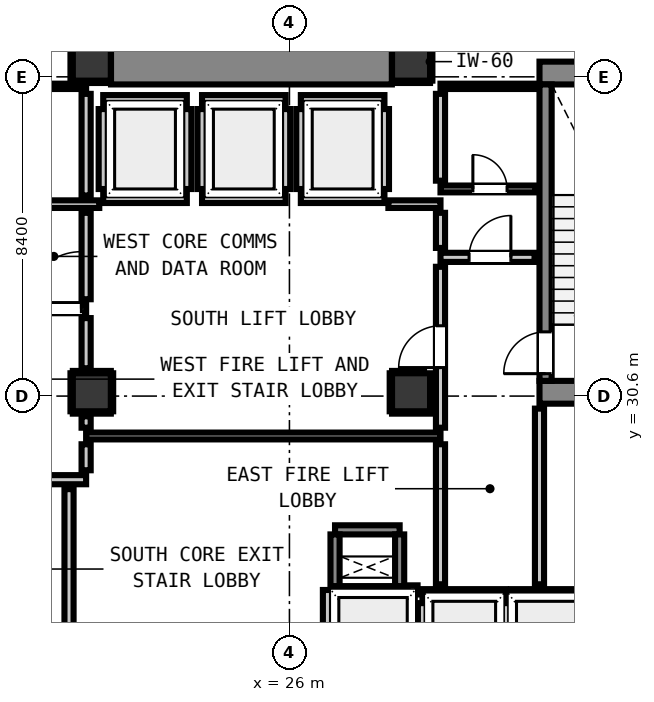
"""IFC4 building model, lengths in metres.
Left out: names, types, materials, properties, quantities, classifications, styles, units other than length and angle.
Written with IfcOpenShell. Run it as: python <this file> out.ifc"""

import sys

from ifc_helpers import new_model, si_unit, direction, frame, frame_2d, origin, origin_2d, place, context, subcontext, project, spatial, rectangle, extrude, element, fill, save


model = new_model("IFC4")
c1 = context("Model", 3, precision=1e-05, world=origin(), true_north=direction((0.0, 1.0)))
c2 = subcontext(c1, "Body", "Model", "MODEL_VIEW")
j1 = project(units=[si_unit("LENGTHUNIT", "METRE"), si_unit("PLANEANGLEUNIT", "RADIAN")], contexts=[c1])
p1 = place(None, origin())
s1 = spatial("IfcSite", under=j1, at=p1, CompositionType="ELEMENT")
p2 = place(p1, origin())
s2 = spatial("IfcBuilding", under=s1, at=p2, CompositionType="ELEMENT")
p3 = place(p2, frame((0.0, 0.0, 9.4)))
s3 = spatial("IfcBuildingStorey", under=s2, at=p3, CompositionType="ELEMENT", Elevation=9.4)
for number, where, z_axis, x_axis in (
    (1, (20.8, 39.4, 0.0), (0.0, 0.0, 1.0), (1.0, 0.0, 0.0)),
    (2, (29.2, 39.4, 0.0), (0.0, 0.0, 1.0), (1.0, 0.0, 0.0)),
):
    element("IfcColumn", number, at=place(p3, frame(where, z_axis=z_axis, x_axis=x_axis)), inside=s3, PredefinedType="COLUMN", context=c2, shape_type="SweptSolid", body=[
        extrude(rectangle(XDim=1.0, YDim=1.0, at=origin_2d()), origin(), (0.0, 0.0, 1.0), 4.2),
    ])
p4 = place(p3, frame((32.58, 39.1, 0.0), z_axis=(0.0, 0.0, 1.0), x_axis=(1.0, 0.0, 0.0)))
e3 = element("IfcWall", 3, at=p4, inside=s3, PredefinedType="SHEAR", context=c2, shape_type="SweptSolid", body=[
    extrude(rectangle(XDim=4.08, YDim=0.6, at=frame_2d((2.04, 0.0))), origin(), (0.0, 0.0, 1.0), 4.2),
])
p5 = place(p3, frame((32.58, 30.7, 0.0), z_axis=(0.0, 0.0, 1.0), x_axis=(1.0, 0.0, 0.0)))
e4 = element("IfcWall", 4, at=p5, inside=s3, PredefinedType="SHEAR", context=c2, shape_type="SweptSolid", body=[
    extrude(rectangle(XDim=3.415, YDim=0.6, at=frame_2d((1.708, 0.0))), origin(), (0.0, 0.0, 1.0), 4.2),
])
p6 = place(p3, frame((21.305, 39.4, 0.0), z_axis=(0.0, 0.0, 1.0), x_axis=(1.0, 0.0, 0.0)))
e5 = element("IfcWall", 5, at=p6, inside=s3, PredefinedType="SHEAR", context=c2, shape_type="SweptSolid", body=[
    extrude(rectangle(XDim=7.39, YDim=1.2, at=frame_2d((3.695, 0.0))), origin(), (0.0, 0.0, 1.0), 4.2),
])
p7 = place(p3, frame((32.74, 31.0, 0.0), z_axis=(0.0, 0.0, 1.0), x_axis=(0.0, 1.0, 0.0)))
e6 = element("IfcWall", 6, at=p7, inside=s3, PredefinedType="SHEAR", context=c2, shape_type="SweptSolid", body=[
    extrude(rectangle(XDim=7.8, YDim=0.32, at=frame_2d((3.9, 0.0))), origin(), (0.0, 0.0, 1.0), 4.2),
])
p8 = place(p7, frame((0.19, 0.0, 0.0)))
e7 = element("IfcOpeningElement", 7, at=p8, cuts=e6, PredefinedType="OPENING", context=c2, shape_type="SweptSolid", body=[
    extrude(rectangle(XDim=1.1, YDim=2.15, at=frame_2d((0.55, 1.075))), frame((0.0, 0.17, 0.0), z_axis=(0.0, -1.0, 0.0), x_axis=(1.0, 0.0, 0.0)), (0.0, 0.0, 1.0), 0.34),
])
for number, where, z_axis, x_axis in (
    (8, (27.2, 25.48, 0.0), (0.0, 0.0, 1.0), (1.0, 0.0, 0.0)),
    (9, (27.2, 27.08, 0.0), (0.0, 0.0, 1.0), (1.0, 0.0, 0.0)),
):
    element("IfcWall", number, at=place(p3, frame(where, z_axis=z_axis, x_axis=x_axis)), inside=s3, PredefinedType="SHEAR", context=c2, shape_type="SweptSolid", body=[
        extrude(rectangle(XDim=1.7, YDim=0.24, at=frame_2d((0.85, 0.0))), origin(), (0.0, 0.0, 1.0), 4.2),
    ])
for number, where, z_axis, x_axis in (
    (10, (27.2, 25.6, 0.0), (0.0, 0.0, 1.0), (0.0, 1.0, 0.0)),
    (11, (28.9, 25.6, 0.0), (0.0, 0.0, 1.0), (0.0, 1.0, 0.0)),
):
    element("IfcWall", number, at=place(p3, frame(where, z_axis=z_axis, x_axis=x_axis)), inside=s3, PredefinedType="SHEAR", context=c2, shape_type="SweptSolid", body=[
        extrude(rectangle(XDim=1.36, YDim=0.24, at=frame_2d((0.68, 0.0))), origin(), (0.0, 0.0, 1.0), 4.2),
    ])
for number, where, z_axis, x_axis in (
    (12, (20.8, 30.7, 0.0), (0.0, 0.0, 1.0), (1.0, 0.0, 0.0)),
    (13, (29.2, 30.7, 0.0), (0.0, 0.0, 1.0), (1.0, 0.0, 0.0)),
):
    element("IfcColumn", number, at=place(p3, frame(where, z_axis=z_axis, x_axis=x_axis)), inside=s3, PredefinedType="COLUMN", context=c2, shape_type="SweptSolid", body=[
        extrude(rectangle(XDim=1.0, YDim=1.0, at=origin_2d()), origin(), (0.0, 0.0, 1.0), 4.2),
    ])
for number, where, z_axis, x_axis in (
    (14, (21.1, 35.8, 0.0), (0.0, 0.0, 1.0), (1.0, 0.0, 0.0)),
    (15, (21.1, 38.4, 0.0), (0.0, 0.0, 1.0), (1.0, 0.0, 0.0)),
):
    element("IfcWall", number, at=place(p3, frame(where, z_axis=z_axis, x_axis=x_axis)), inside=s3, PredefinedType="PARTITIONING", context=c2, shape_type="SweptSolid", body=[
        extrude(rectangle(XDim=2.2, YDim=0.24, at=frame_2d((1.1, 0.0))), origin(), (0.0, 0.0, 1.0), 3.92),
    ])
p9 = place(p3, frame((21.1, 36.048, 0.0), z_axis=(0.0, 0.0, 1.0), x_axis=(0.0, 1.0, 0.0)))
e16 = element("IfcWall", 16, at=p9, inside=s3, PredefinedType="PARTITIONING", context=c2, shape_type="SweptSolid", body=[
    extrude(rectangle(XDim=2.104, YDim=0.24, at=frame_2d((1.052, 0.0))), origin(), (0.0, 0.0, 1.0), 2.955),
])
p10 = place(p3, frame((23.3, 36.048, 0.0), z_axis=(0.0, 0.0, 1.0), x_axis=(0.0, 1.0, 0.0)))
e17 = element("IfcWall", 17, at=p10, inside=s3, PredefinedType="PARTITIONING", context=c2, shape_type="SweptSolid", body=[
    extrude(rectangle(XDim=2.104, YDim=0.24, at=frame_2d((1.052, 0.0))), origin(), (0.0, 0.0, 1.0), 3.92),
])
for number, where, z_axis, x_axis in (
    (18, (23.7, 35.8, 0.0), (0.0, 0.0, 1.0), (1.0, 0.0, 0.0)),
    (19, (23.7, 38.4, 0.0), (0.0, 0.0, 1.0), (1.0, 0.0, 0.0)),
):
    element("IfcWall", number, at=place(p3, frame(where, z_axis=z_axis, x_axis=x_axis)), inside=s3, PredefinedType="PARTITIONING", context=c2, shape_type="SweptSolid", body=[
        extrude(rectangle(XDim=2.2, YDim=0.24, at=frame_2d((1.1, 0.0))), origin(), (0.0, 0.0, 1.0), 3.92),
    ])
for number, where, z_axis, x_axis in (
    (20, (23.7, 36.048, 0.0), (0.0, 0.0, 1.0), (0.0, 1.0, 0.0)),
    (21, (25.9, 36.048, 0.0), (0.0, 0.0, 1.0), (0.0, 1.0, 0.0)),
):
    element("IfcWall", number, at=place(p3, frame(where, z_axis=z_axis, x_axis=x_axis)), inside=s3, PredefinedType="PARTITIONING", context=c2, shape_type="SweptSolid", body=[
        extrude(rectangle(XDim=2.104, YDim=0.24, at=frame_2d((1.052, 0.0))), origin(), (0.0, 0.0, 1.0), 3.92),
    ])
for number, where, z_axis, x_axis in (
    (22, (26.3, 35.8, 0.0), (0.0, 0.0, 1.0), (1.0, 0.0, 0.0)),
    (23, (26.3, 38.4, 0.0), (0.0, 0.0, 1.0), (1.0, 0.0, 0.0)),
):
    element("IfcWall", number, at=place(p3, frame(where, z_axis=z_axis, x_axis=x_axis)), inside=s3, PredefinedType="PARTITIONING", context=c2, shape_type="SweptSolid", body=[
        extrude(rectangle(XDim=2.2, YDim=0.24, at=frame_2d((1.1, 0.0))), origin(), (0.0, 0.0, 1.0), 3.92),
    ])
for number, where, z_axis, x_axis in (
    (24, (26.3, 36.048, 0.0), (0.0, 0.0, 1.0), (0.0, 1.0, 0.0)),
    (25, (28.5, 36.048, 0.0), (0.0, 0.0, 1.0), (0.0, 1.0, 0.0)),
):
    element("IfcWall", number, at=place(p3, frame(where, z_axis=z_axis, x_axis=x_axis)), inside=s3, PredefinedType="PARTITIONING", context=c2, shape_type="SweptSolid", body=[
        extrude(rectangle(XDim=2.104, YDim=0.24, at=frame_2d((1.052, 0.0))), origin(), (0.0, 0.0, 1.0), 3.92),
    ])
p11 = place(p3, frame((29.5, 25.4, 0.0), z_axis=(0.0, 0.0, 1.0), x_axis=(1.0, 0.0, 0.0)))
e26 = element("IfcWall", 26, at=p11, inside=s3, PredefinedType="PARTITIONING", context=c2, shape_type="SweptSolid", body=[
    extrude(rectangle(XDim=2.2, YDim=0.24, at=frame_2d((1.1, 0.0))), origin(), (0.0, 0.0, 1.0), 3.92),
])
p12 = place(p3, frame((29.5, 22.632, 0.0), z_axis=(0.0, 0.0, 1.0), x_axis=(0.0, 1.0, 0.0)))
e27 = element("IfcWall", 27, at=p12, inside=s3, PredefinedType="PARTITIONING", context=c2, shape_type="SweptSolid", body=[
    extrude(rectangle(XDim=2.52, YDim=0.24, at=frame_2d((1.26, 0.0))), origin(), (0.0, 0.0, 1.0), 2.955),
])
p13 = place(p3, frame((31.7, 22.73, 0.0), z_axis=(0.0, 0.0, 1.0), x_axis=(0.0, 1.0, 0.0)))
e28 = element("IfcWall", 28, at=p13, inside=s3, PredefinedType="PARTITIONING", context=c2, shape_type="SweptSolid", body=[
    extrude(rectangle(XDim=2.422, YDim=0.24, at=frame_2d((1.211, 0.0))), origin(), (0.0, 0.0, 1.0), 3.92),
])
p14 = place(p3, frame((31.828, 25.4, 0.0), z_axis=(0.0, 0.0, 1.0), x_axis=(1.0, 0.0, 0.0)))
e29 = element("IfcWall", 29, at=p14, inside=s3, PredefinedType="PARTITIONING", context=c2, shape_type="SweptSolid", body=[
    extrude(rectangle(XDim=2.072, YDim=0.24, at=frame_2d((1.036, 0.0))), origin(), (0.0, 0.0, 1.0), 3.92),
])
p15 = place(p3, frame((29.103, 25.5, 0.0), z_axis=(0.0, 0.0, 1.0), x_axis=(1.0, 0.0, 0.0)))
e30 = element("IfcWall", 30, at=p15, inside=s3, PredefinedType="PARTITIONING", context=c2, shape_type="SweptSolid", body=[
    extrude(rectangle(XDim=0.269, YDim=0.24, at=frame_2d((0.135, 0.0))), origin(), (0.0, 0.0, 1.0), 3.92),
])
p16 = place(p3, frame((27.0, 22.73, 0.0), z_axis=(0.0, 0.0, 1.0), x_axis=(0.0, 1.0, 0.0)))
e31 = element("IfcWall", 31, at=p16, inside=s3, PredefinedType="PARTITIONING", context=c2, shape_type="SweptSolid", body=[
    extrude(rectangle(XDim=2.768, YDim=0.24, at=frame_2d((1.384, 0.0))), origin(), (0.0, 0.0, 1.0), 3.92),
])
p17 = place(p3, frame((17.45, 28.4, 0.0), z_axis=(0.0, 0.0, 1.0), x_axis=(1.0, 0.0, 0.0)))
e32 = element("IfcWall", 32, at=p17, inside=s3, PredefinedType="PARTITIONING", context=c2, shape_type="SweptSolid", body=[
    extrude(rectangle(XDim=3.2, YDim=0.24, at=frame_2d((1.6, 0.0))), origin(), (0.0, 0.0, 1.0), 3.92),
])
p18 = place(p17, frame((0.784, 0.0, 0.0)))
e33 = element("IfcOpeningElement", 33, at=p18, cuts=e32, PredefinedType="OPENING", context=c2, shape_type="SweptSolid", body=[
    extrude(rectangle(XDim=1.1, YDim=2.15, at=frame_2d((0.55, 1.075))), frame((0.0, 0.13, 0.0), z_axis=(0.0, -1.0, 0.0), x_axis=(1.0, 0.0, 0.0)), (0.0, 0.0, 1.0), 0.26),
])
p19 = place(p3, frame((17.45, 32.9, 0.0), z_axis=(0.0, 0.0, 1.0), x_axis=(1.0, 0.0, 0.0)))
e34 = element("IfcWall", 34, at=p19, inside=s3, PredefinedType="PARTITIONING", context=c2, shape_type="SweptSolid", body=[
    extrude(rectangle(XDim=3.2, YDim=0.24, at=frame_2d((1.6, 0.0))), origin(), (0.0, 0.0, 1.0), 3.92),
])
p20 = place(p19, frame((0.159, 0.0, 0.0)))
e35 = element("IfcOpeningElement", 35, at=p20, cuts=e34, PredefinedType="OPENING", context=c2, shape_type="SweptSolid", body=[
    extrude(rectangle(XDim=1.1, YDim=2.15, at=frame_2d((0.55, 1.075))), frame((0.0, 0.13, 0.0), z_axis=(0.0, -1.0, 0.0), x_axis=(1.0, 0.0, 0.0)), (0.0, 0.0, 1.0), 0.26),
])
p21 = place(p19, frame((1.576, 0.0, 0.0)))
e36 = element("IfcOpeningElement", 36, at=p21, cuts=e34, PredefinedType="OPENING", context=c2, shape_type="SweptSolid", body=[
    extrude(rectangle(XDim=1.5, YDim=2.15, at=frame_2d((0.75, 1.075))), frame((0.0, 0.13, 0.0), z_axis=(0.0, -1.0, 0.0), x_axis=(1.0, 0.0, 0.0)), (0.0, 0.0, 1.0), 0.26),
])
p22 = place(p3, frame((29.975, 34.25, 0.0), z_axis=(0.0, 0.0, 1.0), x_axis=(1.0, 0.0, 0.0)))
e37 = element("IfcWall", 37, at=p22, inside=s3, PredefinedType="PARTITIONING", context=c2, shape_type="SweptSolid", body=[
    extrude(rectangle(XDim=2.475, YDim=0.24, at=frame_2d((1.237, 0.0))), origin(), (0.0, 0.0, 1.0), 3.92),
])
p23 = place(p22, frame((0.752, 0.0, 0.0)))
e38 = element("IfcOpeningElement", 38, at=p23, cuts=e37, PredefinedType="OPENING", context=c2, shape_type="SweptSolid", body=[
    extrude(rectangle(XDim=1.1, YDim=2.15, at=frame_2d((0.55, 1.075))), frame((0.0, 0.13, 0.0), z_axis=(0.0, -1.0, 0.0), x_axis=(1.0, 0.0, 0.0)), (0.0, 0.0, 1.0), 0.26),
])
p24 = place(p3, frame((18.95, 35.65, 0.0), z_axis=(0.0, 0.0, 1.0), x_axis=(1.0, 0.0, 0.0)))
e39 = element("IfcWall", 39, at=p24, inside=s3, PredefinedType="PARTITIONING", context=c2, shape_type="SweptSolid", body=[
    extrude(rectangle(XDim=2.046, YDim=0.2, at=frame_2d((1.023, 0.0))), origin(), (0.0, 0.0, 1.0), 3.92),
])
p25 = place(p3, frame((28.604, 35.65, 0.0), z_axis=(0.0, 0.0, 1.0), x_axis=(1.0, 0.0, 0.0)))
e40 = element("IfcWall", 40, at=p25, inside=s3, PredefinedType="PARTITIONING", context=c2, shape_type="SweptSolid", body=[
    extrude(rectangle(XDim=1.371, YDim=0.2, at=frame_2d((0.686, 0.0))), origin(), (0.0, 0.0, 1.0), 3.92),
])
p26 = place(p3, frame((20.65, 29.55, 0.0), z_axis=(0.0, 0.0, 1.0), x_axis=(1.0, 0.0, 0.0)))
e41 = element("IfcWall", 41, at=p26, inside=s3, PredefinedType="PARTITIONING", context=c2, shape_type="SweptSolid", body=[
    extrude(rectangle(XDim=9.325, YDim=0.18, at=frame_2d((4.663, 0.0))), origin(), (0.0, 0.0, 1.0), 3.92),
])
p27 = place(p3, frame((29.975, 36.05, 0.0), z_axis=(0.0, 0.0, 1.0), x_axis=(1.0, 0.0, 0.0)))
e42 = element("IfcWall", 42, at=p27, inside=s3, PredefinedType="PARTITIONING", context=c2, shape_type="SweptSolid", body=[
    extrude(rectangle(XDim=2.505, YDim=0.18, at=frame_2d((1.252, 0.0))), origin(), (0.0, 0.0, 1.0), 3.92),
])
p28 = place(p27, frame((0.852, 0.0, 0.0)))
e43 = element("IfcOpeningElement", 43, at=p28, cuts=e42, PredefinedType="OPENING", context=c2, shape_type="SweptSolid", body=[
    extrude(rectangle(XDim=0.9, YDim=2.1, at=frame_2d((0.45, 1.05))), frame((0.0, 0.1, 0.0), z_axis=(0.0, -1.0, 0.0), x_axis=(1.0, 0.0, 0.0)), (0.0, 0.0, 1.0), 0.2),
])
p29 = place(p3, frame((18.95, 38.75, 0.0), z_axis=(0.0, 0.0, 1.0), x_axis=(1.0, 0.0, 0.0)))
e44 = element("IfcWall", 44, at=p29, inside=s3, PredefinedType="PARTITIONING", context=c2, shape_type="SweptSolid", body=[
    extrude(rectangle(XDim=1.7, YDim=0.14, at=frame_2d((0.85, 0.0))), origin(), (0.0, 0.0, 1.0), 3.92),
])
p30 = place(p3, frame((29.975, 38.75, 0.0), z_axis=(0.0, 0.0, 1.0), x_axis=(1.0, 0.0, 0.0)))
e45 = element("IfcWall", 45, at=p30, inside=s3, PredefinedType="PARTITIONING", context=c2, shape_type="SweptSolid", body=[
    extrude(rectangle(XDim=2.525, YDim=0.14, at=frame_2d((1.262, 0.0))), origin(), (0.0, 0.0, 1.0), 3.92),
])
p31 = place(p3, frame((20.2, 22.586, 0.0), z_axis=(0.0, 0.0, 1.0), x_axis=(0.0, 1.0, 0.0)))
e46 = element("IfcWall", 46, at=p31, inside=s3, PredefinedType="PARTITIONING", context=c2, shape_type="SweptSolid", body=[
    extrude(rectangle(XDim=5.566, YDim=0.24, at=frame_2d((2.783, 0.0))), origin(), (0.0, 0.0, 1.0), 3.92),
])
p32 = place(p3, frame((20.65, 28.648, 0.0), z_axis=(0.0, 0.0, 1.0), x_axis=(0.0, 1.0, 0.0)))
e47 = element("IfcWall", 47, at=p32, inside=s3, PredefinedType="PARTITIONING", context=c2, shape_type="SweptSolid", body=[
    extrude(rectangle(XDim=0.684, YDim=0.24, at=frame_2d((0.342, 0.0))), origin(), (0.0, 0.0, 1.0), 2.955),
])
p33 = place(p3, frame((20.65, 29.768, 0.0), z_axis=(0.0, 0.0, 1.0), x_axis=(0.0, 1.0, 0.0)))
e48 = element("IfcWall", 48, at=p33, inside=s3, PredefinedType="PARTITIONING", context=c2, shape_type="SweptSolid", body=[
    extrude(rectangle(XDim=0.3, YDim=0.24, at=frame_2d((0.15, 0.0))), origin(), (0.0, 0.0, 1.0), 2.955),
])
p34 = place(p3, frame((20.65, 31.332, 0.0), z_axis=(0.0, 0.0, 1.0), x_axis=(0.0, 1.0, 0.0)))
e49 = element("IfcWall", 49, at=p34, inside=s3, PredefinedType="PARTITIONING", context=c2, shape_type="SweptSolid", body=[
    extrude(rectangle(XDim=1.32, YDim=0.24, at=frame_2d((0.66, 0.0))), origin(), (0.0, 0.0, 1.0), 2.955),
])
p35 = place(p3, frame((20.65, 33.148, 0.0), z_axis=(0.0, 0.0, 1.0), x_axis=(0.0, 1.0, 0.0)))
e50 = element("IfcWall", 50, at=p35, inside=s3, PredefinedType="PARTITIONING", context=c2, shape_type="SweptSolid", body=[
    extrude(rectangle(XDim=2.274, YDim=0.24, at=frame_2d((1.137, 0.0))), origin(), (0.0, 0.0, 1.0), 2.955),
])
p36 = place(p3, frame((20.65, 35.878, 0.0), z_axis=(0.0, 0.0, 1.0), x_axis=(0.0, 1.0, 0.0)))
e51 = element("IfcWall", 51, at=p36, inside=s3, PredefinedType="PARTITIONING", context=c2, shape_type="SweptSolid", body=[
    extrude(rectangle(XDim=2.674, YDim=0.24, at=frame_2d((1.337, 0.0))), origin(), (0.0, 0.0, 1.0), 2.955),
])
p37 = place(p3, frame((29.975, 25.648, 0.0), z_axis=(0.0, 0.0, 1.0), x_axis=(0.0, 1.0, 0.0)))
e52 = element("IfcWall", 52, at=p37, inside=s3, PredefinedType="PARTITIONING", context=c2, shape_type="SweptSolid", body=[
    extrude(rectangle(XDim=3.684, YDim=0.24, at=frame_2d((1.842, 0.0))), origin(), (0.0, 0.0, 1.0), 3.92),
])
p38 = place(p3, frame((29.975, 29.768, 0.0), z_axis=(0.0, 0.0, 1.0), x_axis=(0.0, 1.0, 0.0)))
e53 = element("IfcWall", 53, at=p38, inside=s3, PredefinedType="PARTITIONING", context=c2, shape_type="SweptSolid", body=[
    extrude(rectangle(XDim=4.234, YDim=0.24, at=frame_2d((2.117, 0.0))), origin(), (0.0, 0.0, 1.0), 3.92),
])
p39 = place(p38, frame((1.582, 0.0, 0.0)))
e54 = element("IfcOpeningElement", 54, at=p39, cuts=e53, PredefinedType="OPENING", context=c2, shape_type="SweptSolid", body=[
    extrude(rectangle(XDim=1.1, YDim=2.15, at=frame_2d((0.55, 1.075))), frame((0.0, 0.13, 0.0), z_axis=(0.0, -1.0, 0.0), x_axis=(1.0, 0.0, 0.0)), (0.0, 0.0, 1.0), 0.26),
])
p40 = place(p3, frame((29.975, 34.498, 0.0), z_axis=(0.0, 0.0, 1.0), x_axis=(0.0, 1.0, 0.0)))
e55 = element("IfcWall", 55, at=p40, inside=s3, PredefinedType="PARTITIONING", context=c2, shape_type="SweptSolid", body=[
    extrude(rectangle(XDim=0.924, YDim=0.24, at=frame_2d((0.462, 0.0))), origin(), (0.0, 0.0, 1.0), 3.92),
])
p41 = place(p3, frame((29.975, 36.268, 0.0), z_axis=(0.0, 0.0, 1.0), x_axis=(0.0, 1.0, 0.0)))
e56 = element("IfcWall", 56, at=p41, inside=s3, PredefinedType="PARTITIONING", context=c2, shape_type="SweptSolid", body=[
    extrude(rectangle(XDim=2.284, YDim=0.24, at=frame_2d((1.142, 0.0))), origin(), (0.0, 0.0, 1.0), 3.92),
])
p42 = place(p3, frame((32.58, 25.648, 0.0), z_axis=(0.0, 0.0, 1.0), x_axis=(0.0, 1.0, 0.0)))
e57 = element("IfcWall", 57, at=p42, inside=s3, PredefinedType="PARTITIONING", context=c2, shape_type="SweptSolid", body=[
    extrude(rectangle(XDim=4.622, YDim=0.24, at=frame_2d((2.311, 0.0))), origin(), (0.0, 0.0, 1.0), 3.92),
])
p43 = place(p3, frame((20.3, 38.868, 0.0), z_axis=(0.0, 0.0, 1.0), x_axis=(1.0, 0.0, 0.0)))
e58 = element("IfcWall", 58, at=p43, inside=s3, PredefinedType="PARTITIONING", context=c2, shape_type="SweptSolid", body=[
    extrude(rectangle(XDim=0.99, YDim=0.06, at=frame_2d((0.495, 0.0))), origin(), (0.0, 0.0, 1.0), 1.45),
])
p44 = place(p3, frame((20.268, 38.9, 0.0), z_axis=(0.0, 0.0, 1.0), x_axis=(0.0, 1.0, 0.0)))
e59 = element("IfcWall", 59, at=p44, inside=s3, PredefinedType="PARTITIONING", context=c2, shape_type="SweptSolid", body=[
    extrude(rectangle(XDim=1.0, YDim=0.06, at=frame_2d((0.5, 0.0))), origin(), (0.0, 0.0, 1.0), 1.45),
])
p45 = place(p3, frame((28.71, 38.868, 0.0), z_axis=(0.0, 0.0, 1.0), x_axis=(1.0, 0.0, 0.0)))
e60 = element("IfcWall", 60, at=p45, inside=s3, PredefinedType="PARTITIONING", context=c2, shape_type="SweptSolid", body=[
    extrude(rectangle(XDim=0.99, YDim=0.06, at=frame_2d((0.495, 0.0))), origin(), (0.0, 0.0, 1.0), 1.45),
])
for number, where, z_axis, x_axis in (
    (61, (29.732, 38.9, 0.0), (0.0, 0.0, 1.0), (0.0, 1.0, 0.0)),
    (62, (20.3, 30.168, 0.0), (0.0, 0.0, 1.0), (1.0, 0.0, 0.0)),
    (63, (20.3, 31.232, 0.0), (0.0, 0.0, 1.0), (1.0, 0.0, 0.0)),
    (64, (20.268, 30.2, 0.0), (0.0, 0.0, 1.0), (0.0, 1.0, 0.0)),
    (65, (21.332, 30.2, 0.0), (0.0, 0.0, 1.0), (0.0, 1.0, 0.0)),
    (66, (28.7, 30.168, 0.0), (0.0, 0.0, 1.0), (1.0, 0.0, 0.0)),
):
    element("IfcWall", number, at=place(p3, frame(where, z_axis=z_axis, x_axis=x_axis)), inside=s3, PredefinedType="PARTITIONING", context=c2, shape_type="SweptSolid", body=[
        extrude(rectangle(XDim=1.0, YDim=0.06, at=frame_2d((0.5, 0.0))), origin(), (0.0, 0.0, 1.0), 1.45),
    ])
p46 = place(p3, frame((28.7, 31.232, 0.0), z_axis=(0.0, 0.0, 1.0), x_axis=(1.0, 0.0, 0.0)))
e67 = element("IfcWall", 67, at=p46, inside=s3, PredefinedType="PARTITIONING", context=c2, shape_type="SweptSolid", body=[
    extrude(rectangle(XDim=0.841, YDim=0.06, at=frame_2d((0.42, 0.0))), origin(), (0.0, 0.0, 1.0), 1.45),
])
p47 = place(p3, frame((28.668, 30.2, 0.0), z_axis=(0.0, 0.0, 1.0), x_axis=(0.0, 1.0, 0.0)))
e68 = element("IfcWall", 68, at=p47, inside=s3, PredefinedType="PARTITIONING", context=c2, shape_type="SweptSolid", body=[
    extrude(rectangle(XDim=1.0, YDim=0.06, at=frame_2d((0.5, 0.0))), origin(), (0.0, 0.0, 1.0), 1.45),
])
p48 = place(p3, frame((29.732, 30.2, 0.0), z_axis=(0.0, 0.0, 1.0), x_axis=(0.0, 1.0, 0.0)))
e69 = element("IfcWall", 69, at=p48, inside=s3, PredefinedType="PARTITIONING", context=c2, shape_type="SweptSolid", body=[
    extrude(rectangle(XDim=0.772, YDim=0.06, at=frame_2d((0.386, 0.0))), origin(), (0.0, 0.0, 1.0), 1.45),
])
p49 = place(p8, origin())
e70 = element("IfcDoor", 70, at=p49, inside=s3, OperationType="SINGLE_SWING_LEFT", PredefinedType="DOOR", context=c2, shape_type="SweptSolid", body=[
    extrude(rectangle(XDim=1.1, YDim=2.15, at=frame_2d((0.55, 1.075))), frame((0.0, 0.025, 0.0), z_axis=(0.0, -1.0, 0.0), x_axis=(1.0, 0.0, 0.0)), (0.0, 0.0, 1.0), 0.05),
])
fill(e7, e70)
p50 = place(p39, origin())
e71 = element("IfcDoor", 71, at=p50, inside=s3, OperationType="SINGLE_SWING_LEFT", PredefinedType="DOOR", context=c2, shape_type="SweptSolid", body=[
    extrude(rectangle(XDim=1.1, YDim=2.15, at=frame_2d((0.55, 1.075))), frame((0.0, 0.025, 0.0), z_axis=(0.0, -1.0, 0.0), x_axis=(1.0, 0.0, 0.0)), (0.0, 0.0, 1.0), 0.05),
])
fill(e54, e71)
p51 = place(p23, origin())
e72 = element("IfcDoor", 72, at=p51, inside=s3, OperationType="SINGLE_SWING_RIGHT", PredefinedType="DOOR", context=c2, shape_type="SweptSolid", body=[
    extrude(rectangle(XDim=1.1, YDim=2.15, at=frame_2d((0.55, 1.075))), frame((0.0, 0.025, 0.0), z_axis=(0.0, -1.0, 0.0), x_axis=(1.0, 0.0, 0.0)), (0.0, 0.0, 1.0), 0.05),
])
fill(e38, e72)
p52 = place(p21, origin())
e73 = element("IfcDoor", 73, at=p52, inside=s3, OperationType="SINGLE_SWING_RIGHT", PredefinedType="DOOR", context=c2, shape_type="SweptSolid", body=[
    extrude(rectangle(XDim=1.5, YDim=2.15, at=frame_2d((0.75, 1.075))), frame((0.0, 0.025, 0.0), z_axis=(0.0, -1.0, 0.0), x_axis=(1.0, 0.0, 0.0)), (0.0, 0.0, 1.0), 0.05),
])
fill(e36, e73)
p53 = place(p28, origin())
e74 = element("IfcDoor", 74, at=p53, inside=s3, OperationType="SINGLE_SWING_LEFT", PredefinedType="DOOR", context=c2, shape_type="SweptSolid", body=[
    extrude(rectangle(XDim=0.9, YDim=2.1, at=frame_2d((0.45, 1.05))), frame((0.0, 0.025, 0.0), z_axis=(0.0, -1.0, 0.0), x_axis=(1.0, 0.0, 0.0)), (0.0, 0.0, 1.0), 0.05),
])
fill(e43, e74)
save(model, sys.argv[1])
